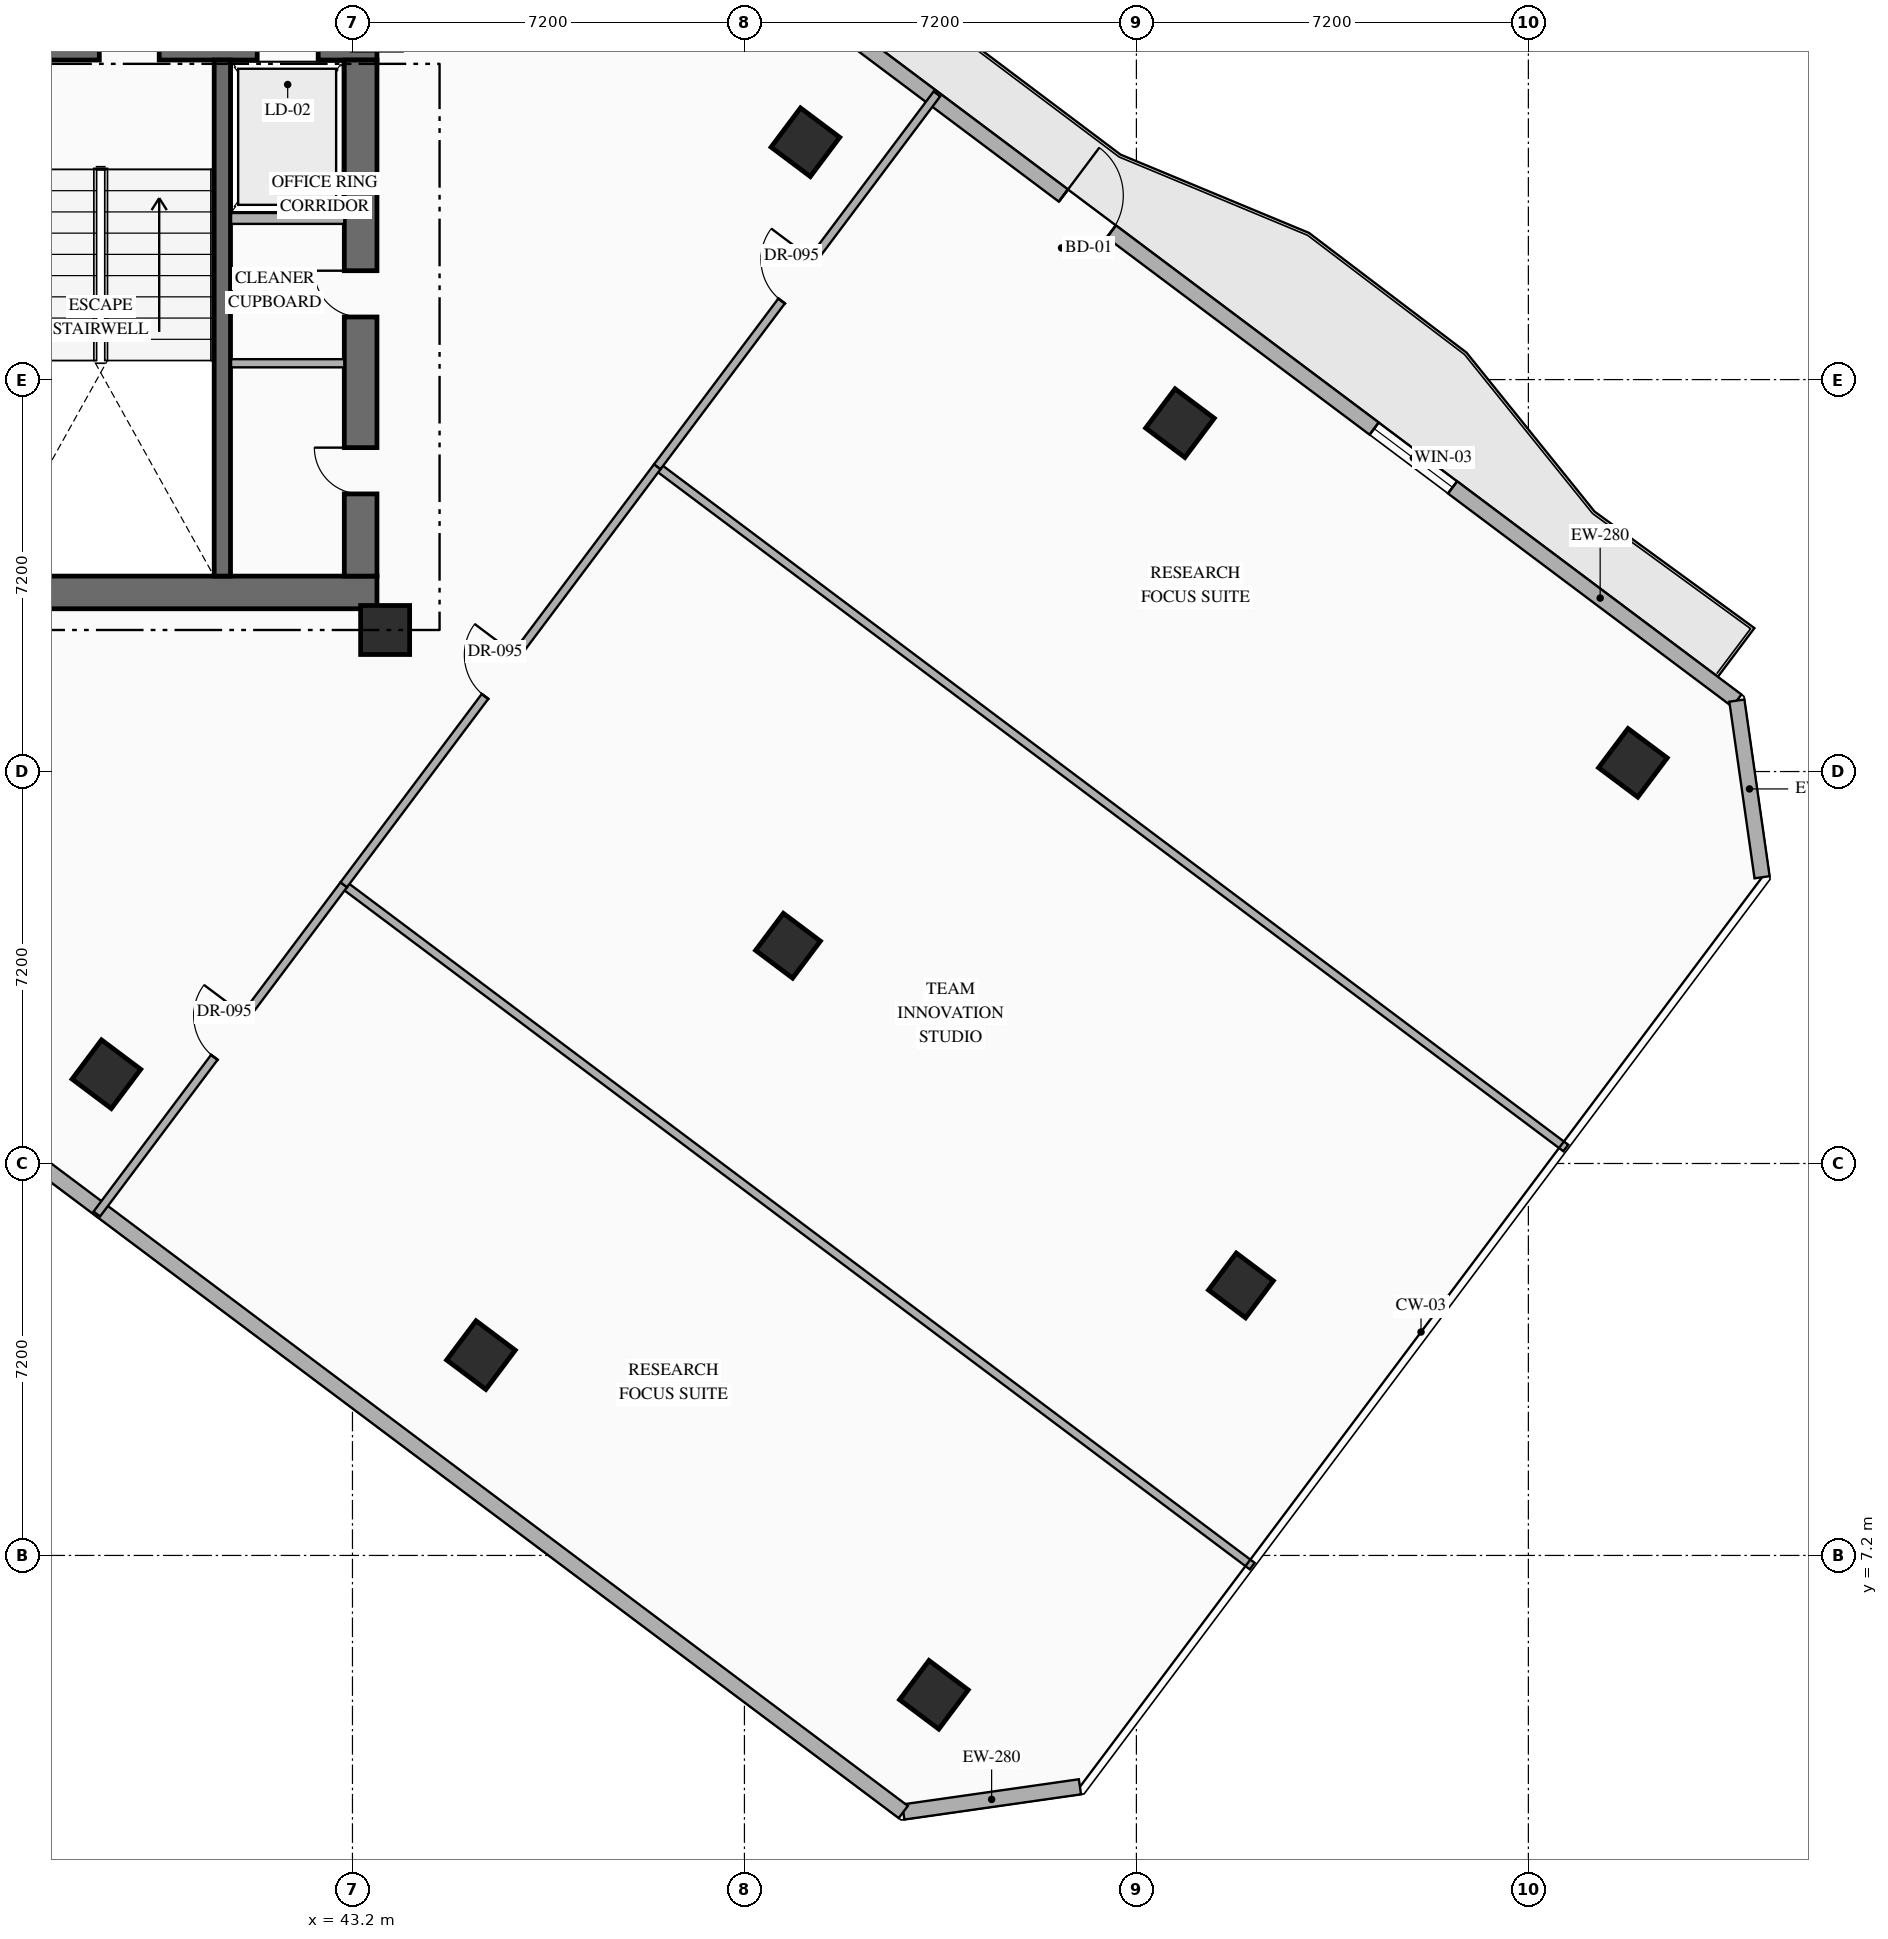
"""IFC4 building model, lengths in metres.
Left out: names, types, materials, properties, quantities, classifications, styles, units other than length and angle.
Written with IfcOpenShell. Run it as: python <this file> out.ifc"""

import sys

from ifc_helpers import new_model, si_unit, direction, frame, frame_2d, origin, origin_2d, place, context, subcontext, project, spatial, rectangle, hollow_rectangle, extrude, element, fill, save


model = new_model("IFC4")
c1 = context("Model", 3, precision=1e-05, world=origin(), true_north=direction((0.0, 1.0)))
c2 = subcontext(c1, "Body", "Model", "MODEL_VIEW")
j1 = project(units=[si_unit("LENGTHUNIT", "METRE"), si_unit("PLANEANGLEUNIT", "RADIAN")], contexts=[c1])
p1 = place(None, origin())
s1 = spatial("IfcSite", under=j1, at=p1, CompositionType="ELEMENT")
p2 = place(p1, origin())
s2 = spatial("IfcBuilding", under=s1, at=p2, CompositionType="ELEMENT")
p3 = place(p2, frame((0.0, 0.0, 119.25)))
s3 = spatial("IfcBuildingStorey", under=s2, at=p3, CompositionType="ELEMENT", Elevation=119.25)
p4 = place(p3, frame((35.89, 24.89, 0.0), z_axis=(0.0, 0.0, 1.0), x_axis=(1.0, 0.0, 0.0)))
e1 = element("IfcWall", 1, at=p4, inside=s3, PredefinedType="SHEAR", context=c2, shape_type="SweptSolid", body=[
    extrude(rectangle(XDim=7.76, YDim=0.6, at=frame_2d((3.88, 0.0))), origin(), (0.0, 0.0, 1.0), 3.6),
])
p5 = place(p3, frame((35.89, 34.97, 0.0), z_axis=(0.0, 0.0, 1.0), x_axis=(1.0, 0.0, 0.0)))
e2 = element("IfcWall", 2, at=p5, inside=s3, PredefinedType="SHEAR", context=c2, shape_type="SweptSolid", body=[
    extrude(rectangle(XDim=7.76, YDim=0.6, at=frame_2d((3.88, 0.0))), origin(), (0.0, 0.0, 1.0), 3.6),
])
p6 = place(p5, frame((2.66, 0.0, 0.0)))
e3 = element("IfcOpeningElement", 3, at=p6, cuts=e2, PredefinedType="OPENING", context=c2, shape_type="SweptSolid", body=[
    extrude(rectangle(XDim=1.1, YDim=2.2, at=frame_2d((0.55, 1.1))), frame((0.0, 0.31, 0.0), z_axis=(0.0, -1.0, 0.0), x_axis=(1.0, 0.0, 0.0)), (0.0, 0.0, 1.0), 0.62),
])
p7 = place(p5, frame((5.56, 0.0, 0.0)))
e4 = element("IfcOpeningElement", 4, at=p7, cuts=e2, PredefinedType="OPENING", context=c2, shape_type="SweptSolid", body=[
    extrude(rectangle(XDim=1.12, YDim=2.15, at=frame_2d((0.56, 1.075))), frame((0.0, 0.31, 0.0), z_axis=(0.0, -1.0, 0.0), x_axis=(1.0, 0.0, 0.0)), (0.0, 0.0, 1.0), 0.62),
])
p8 = place(p3, frame((43.35, 25.19, 0.0), z_axis=(0.0, 0.0, 1.0), x_axis=(0.0, 1.0, 0.0)))
e5 = element("IfcWall", 5, at=p8, inside=s3, PredefinedType="SHEAR", context=c2, shape_type="SweptSolid", body=[
    extrude(rectangle(XDim=9.48, YDim=0.6, at=frame_2d((4.74, 0.0))), origin(), (0.0, 0.0, 1.0), 3.6),
])
p9 = place(p8, frame((1.51, 0.0, 0.0)))
e6 = element("IfcOpeningElement", 6, at=p9, cuts=e5, PredefinedType="OPENING", context=c2, shape_type="SweptSolid", body=[
    extrude(rectangle(XDim=0.85, YDim=2.08, at=frame_2d((0.425, 1.04))), frame((0.0, 0.31, 0.0), z_axis=(0.0, -1.0, 0.0), x_axis=(1.0, 0.0, 0.0)), (0.0, 0.0, 1.0), 0.62),
])
p10 = place(p8, frame((4.76, 0.0, 0.0)))
e7 = element("IfcOpeningElement", 7, at=p10, cuts=e5, PredefinedType="OPENING", context=c2, shape_type="SweptSolid", body=[
    extrude(rectangle(XDim=0.85, YDim=2.08, at=frame_2d((0.425, 1.04))), frame((0.0, 0.31, 0.0), z_axis=(0.0, -1.0, 0.0), x_axis=(1.0, 0.0, 0.0)), (0.0, 0.0, 1.0), 0.62),
])
p11 = place(p3, frame((40.81, 25.19, 0.0), z_axis=(0.0, 0.0, 1.0), x_axis=(0.0, 1.0, 0.0)))
e8 = element("IfcWall", 8, at=p11, inside=s3, PredefinedType="SHEAR", context=c2, shape_type="SweptSolid", body=[
    extrude(rectangle(XDim=9.48, YDim=0.3, at=frame_2d((4.74, 0.0))), origin(), (0.0, 0.0, 1.0), 3.6),
])
p12 = place(p3, frame((43.8, 24.2, 0.0), z_axis=(0.0, 0.0, 1.0), x_axis=(1.0, 0.0, 0.0)))
e9 = element("IfcColumn", 9, at=p12, inside=s3, PredefinedType="COLUMN", context=c2, shape_type="SweptSolid", body=[
    extrude(rectangle(XDim=0.9, YDim=0.9, at=origin_2d()), origin(), (0.0, 0.0, 1.0), 3.6),
])
for number, where, z_axis, x_axis in (
    (10, (38.68, 16.04, 0.0), (0.0, 0.0, 1.0), (0.8, -0.6, 0.0)),
    (11, (51.52, 33.16, 0.0), (0.0, 0.0, 1.0), (0.8, -0.6, 0.0)),
    (12, (45.56, 10.88, 0.0), (0.0, 0.0, 1.0), (0.8, -0.6, 0.0)),
    (13, (58.4, 28.0, 0.0), (0.0, 0.0, 1.0), (0.8, -0.6, 0.0)),
):
    element("IfcColumn", number, at=place(p3, frame(where, z_axis=z_axis, x_axis=x_axis)), inside=s3, PredefinedType="COLUMN", context=c2, shape_type="SweptSolid", body=[
        extrude(hollow_rectangle(XDim=0.9, YDim=0.9, WallThickness=0.036, at=origin_2d()), origin(), (0.0, 0.0, 1.0), 3.6),
    ])
p13 = place(p3, frame((51.2, 18.4, 0.0), z_axis=(0.0, 0.0, 1.0), x_axis=(0.799999996291, -0.600000004945, 0.0)))
e14 = element("IfcColumn", 14, at=p13, inside=s3, PredefinedType="COLUMN", context=c2, shape_type="SweptSolid", body=[
    extrude(hollow_rectangle(XDim=0.85, YDim=0.85, WallThickness=0.032, at=origin_2d()), origin(), (0.0, 0.0, 1.0), 3.6),
])
for number, where, z_axis, x_axis in (
    (15, (53.88, 4.64, 0.0), (0.0, 0.0, 1.0), (0.8, -0.6, 0.0)),
    (16, (66.72, 21.76, 0.0), (0.0, 0.0, 1.0), (0.8, -0.6, 0.0)),
):
    element("IfcColumn", number, at=place(p3, frame(where, z_axis=z_axis, x_axis=x_axis)), inside=s3, PredefinedType="COLUMN", context=c2, shape_type="SweptSolid", body=[
        extrude(hollow_rectangle(XDim=0.9, YDim=0.9, WallThickness=0.036, at=origin_2d()), origin(), (0.0, 0.0, 1.0), 3.6),
    ])
p14 = place(p3, frame((59.52, 12.16, 0.0), z_axis=(0.0, 0.0, 1.0), x_axis=(0.799999996291, -0.600000004945, 0.0)))
e17 = element("IfcColumn", 17, at=p14, inside=s3, PredefinedType="COLUMN", context=c2, shape_type="SweptSolid", body=[
    extrude(hollow_rectangle(XDim=0.85, YDim=0.85, WallThickness=0.032, at=origin_2d()), origin(), (0.0, 0.0, 1.0), 3.6),
])
p15 = place(p3, frame((44.86, 40.73, 0.0), z_axis=(0.0, 0.0, 1.0), x_axis=(0.800006902154, -0.599990797017, 0.0)))
e18 = element("IfcWall", 18, at=p15, inside=s3, PredefinedType="STANDARD", context=c2, shape_type="SweptSolid", body=[
    extrude(rectangle(XDim=29.712, YDim=0.28, at=frame_2d((14.856, 0.0))), origin(), (0.0, 0.0, 1.0), 3.35),
])
p16 = place(p15, frame((14.249, 0.0, 0.0)))
e19 = element("IfcOpeningElement", 19, at=p16, cuts=e18, PredefinedType="OPENING", context=c2, shape_type="SweptSolid", body=[
    extrude(rectangle(XDim=1.1, YDim=2.2, at=frame_2d((0.55, 1.1))), frame((0.0, 0.15, 0.0), z_axis=(0.0, -1.0, 0.0), x_axis=(1.0, 0.0, 0.0)), (0.0, 0.0, 1.0), 0.3),
])
p17 = place(p15, frame((6.528, 0.0, 0.85)))
e20 = element("IfcOpeningElement", 20, at=p17, cuts=e18, PredefinedType="OPENING", context=c2, shape_type="SweptSolid", body=[
    extrude(rectangle(XDim=1.8, YDim=2.1, at=frame_2d((0.9, 1.05))), frame((0.0, 0.15, 0.0), z_axis=(0.0, -1.0, 0.0), x_axis=(1.0, 0.0, 0.0)), (0.0, 0.0, 1.0), 0.3),
])
p18 = place(p15, frame((21.384, 0.0, 0.85)))
e21 = element("IfcOpeningElement", 21, at=p18, cuts=e18, PredefinedType="OPENING", context=c2, shape_type="SweptSolid", body=[
    extrude(rectangle(XDim=1.8, YDim=2.1, at=frame_2d((0.9, 1.05))), frame((0.0, 0.15, 0.0), z_axis=(0.0, -1.0, 0.0), x_axis=(1.0, 0.0, 0.0)), (0.0, 0.0, 1.0), 0.3),
])
p19 = place(p3, frame((68.63, 22.903, 0.0), z_axis=(0.0, 0.0, 1.0), x_axis=(0.141285803956, -0.989968848803, 0.0)))
e22 = element("IfcWall", 22, at=p19, inside=s3, PredefinedType="STANDARD", context=c2, shape_type="SweptSolid", body=[
    extrude(rectangle(XDim=3.278, YDim=0.28, at=frame_2d((1.639, 0.0))), origin(), (0.0, 0.0, 1.0), 3.35),
])
p20 = place(p3, frame((56.563, 2.95, 0.0), z_axis=(0.0, 0.0, 1.0), x_axis=(-0.989977778067, -0.141223223777, 0.0)))
e23 = element("IfcWall", 23, at=p20, inside=s3, PredefinedType="STANDARD", context=c2, shape_type="SweptSolid", body=[
    extrude(rectangle(XDim=3.278, YDim=0.28, at=frame_2d((1.639, 0.0))), origin(), (0.0, 0.0, 1.0), 3.35),
])
p21 = place(p3, frame((53.318, 2.487, 0.0), z_axis=(0.0, 0.0, 1.0), x_axis=(-0.800004174678, 0.599994433723, 0.0)))
e24 = element("IfcWall", 24, at=p21, inside=s3, PredefinedType="STANDARD", context=c2, shape_type="SweptSolid", body=[
    extrude(rectangle(XDim=35.089, YDim=0.28, at=frame_2d((17.544, 0.0))), origin(), (0.0, 0.0, 1.0), 3.35),
])
p22 = place(p3, frame((40.97, 31.76, 0.0), z_axis=(0.0, 0.0, 1.0), x_axis=(1.0, 0.0, 0.0)))
e25 = element("IfcWall", 25, at=p22, inside=s3, PredefinedType="STANDARD", context=c2, shape_type="SweptSolid", body=[
    extrude(rectangle(XDim=2.08, YDim=0.2, at=frame_2d((1.04, 0.0))), origin(), (0.0, 0.0, 1.0), 3.35),
])
p23 = place(p3, frame((40.97, 29.1, 0.0), z_axis=(0.0, 0.0, 1.0), x_axis=(1.0, 0.0, 0.0)))
e26 = element("IfcWall", 26, at=p23, inside=s3, PredefinedType="PARTITIONING", context=c2, shape_type="SweptSolid", body=[
    extrude(rectangle(XDim=2.08, YDim=0.15, at=frame_2d((1.04, 0.0))), origin(), (0.0, 0.0, 1.0), 3.35),
])
p24 = place(p3, frame((43.04, 19.52, 0.0), z_axis=(0.0, 0.0, 1.0), x_axis=(0.799997191095, -0.600003745189, 0.0)))
e27 = element("IfcWall", 27, at=p24, inside=s3, PredefinedType="PARTITIONING", context=c2, shape_type="SweptSolid", body=[
    extrude(rectangle(XDim=20.86, YDim=0.15, at=frame_2d((10.43, 0.0))), origin(), (0.0, 0.0, 1.0), 3.35),
])
p25 = place(p3, frame((38.504, 13.472, 0.0), z_axis=(0.0, 0.0, 1.0), x_axis=(0.600005166878, 0.799996124815, 0.0)))
e28 = element("IfcWall", 28, at=p25, inside=s3, PredefinedType="PARTITIONING", context=c2, shape_type="SweptSolid", body=[
    extrude(rectangle(XDim=7.56, YDim=0.15, at=frame_2d((3.78, 0.0))), origin(), (0.0, 0.0, 1.0), 3.35),
])
p26 = place(p25, frame((3.598, 0.0, 0.0)))
e29 = element("IfcOpeningElement", 29, at=p26, cuts=e28, PredefinedType="OPENING", context=c2, shape_type="SweptSolid", body=[
    extrude(rectangle(XDim=0.95, YDim=2.15, at=frame_2d((0.475, 1.075))), frame((0.0, 0.085, 0.0), z_axis=(0.0, -1.0, 0.0), x_axis=(1.0, 0.0, 0.0)), (0.0, 0.0, 1.0), 0.17),
])
p27 = place(p3, frame((48.8, 27.2, 0.0), z_axis=(0.0, 0.0, 1.0), x_axis=(0.800002808908, -0.599996254772, 0.0)))
e30 = element("IfcWall", 30, at=p27, inside=s3, PredefinedType="PARTITIONING", context=c2, shape_type="SweptSolid", body=[
    extrude(rectangle(XDim=20.86, YDim=0.15, at=frame_2d((10.43, 0.0))), origin(), (0.0, 0.0, 1.0), 3.35),
])
p28 = place(p3, frame((43.04, 19.52, 0.0), z_axis=(0.0, 0.0, 1.0), x_axis=(0.600004069023, 0.799996948216, 0.0)))
e31 = element("IfcWall", 31, at=p28, inside=s3, PredefinedType="PARTITIONING", context=c2, shape_type="SweptSolid", body=[
    extrude(rectangle(XDim=9.6, YDim=0.15, at=frame_2d((4.8, 0.0))), origin(), (0.0, 0.0, 1.0), 3.35),
])
p29 = place(p28, frame((4.325, 0.0, 0.0)))
e32 = element("IfcOpeningElement", 32, at=p29, cuts=e31, PredefinedType="OPENING", context=c2, shape_type="SweptSolid", body=[
    extrude(rectangle(XDim=0.95, YDim=2.15, at=frame_2d((0.475, 1.075))), frame((0.0, 0.085, 0.0), z_axis=(0.0, -1.0, 0.0), x_axis=(1.0, 0.0, 0.0)), (0.0, 0.0, 1.0), 0.17),
])
p30 = place(p3, frame((48.8, 27.2, 0.0), z_axis=(0.0, 0.0, 1.0), x_axis=(0.599990873323, 0.800006844926, 0.0)))
e33 = element("IfcWall", 33, at=p30, inside=s3, PredefinedType="PARTITIONING", context=c2, shape_type="SweptSolid", body=[
    extrude(rectangle(XDim=8.56, YDim=0.15, at=frame_2d((4.28, 0.0))), origin(), (0.0, 0.0, 1.0), 3.35),
])
p31 = place(p30, frame((3.805, 0.0, 0.0)))
e34 = element("IfcOpeningElement", 34, at=p31, cuts=e33, PredefinedType="OPENING", context=c2, shape_type="SweptSolid", body=[
    extrude(rectangle(XDim=0.95, YDim=2.15, at=frame_2d((0.475, 1.075))), frame((0.0, 0.085, 0.0), z_axis=(0.0, -1.0, 0.0), x_axis=(1.0, 0.0, 0.0)), (0.0, 0.0, 1.0), 0.17),
])
p32 = place(p16, origin())
e35 = element("IfcDoor", 35, at=p32, inside=s3, OperationType="SINGLE_SWING_LEFT", PredefinedType="DOOR", context=c2, shape_type="SweptSolid", body=[
    extrude(rectangle(XDim=1.1, YDim=2.2, at=frame_2d((0.55, 1.1))), frame((0.0, 0.025, 0.0), z_axis=(0.0, -1.0, 0.0), x_axis=(1.0, 0.0, 0.0)), (0.0, 0.0, 1.0), 0.05),
])
fill(e19, e35)
p33 = place(p18, origin())
e36 = element("IfcWindow", 36, at=p33, inside=s3, PartitioningType="SINGLE_PANEL", PredefinedType="WINDOW", context=c2, shape_type="SweptSolid", body=[
    extrude(rectangle(XDim=1.8, YDim=2.1, at=frame_2d((0.9, 1.05))), frame((0.0, 0.03, 0.0), z_axis=(0.0, -1.0, 0.0), x_axis=(1.0, 0.0, 0.0)), (0.0, 0.0, 1.0), 0.06),
])
fill(e21, e36)
p34 = place(p9, origin())
e37 = element("IfcDoor", 37, at=p34, inside=s3, OperationType="SINGLE_SWING_RIGHT", PredefinedType="DOOR", context=c2, shape_type="SweptSolid", body=[
    extrude(rectangle(XDim=0.85, YDim=2.08, at=frame_2d((0.425, 1.04))), frame((0.0, 0.025, 0.0), z_axis=(0.0, -1.0, 0.0), x_axis=(1.0, 0.0, 0.0)), (0.0, 0.0, 1.0), 0.05),
])
fill(e6, e37)
p35 = place(p10, origin())
e38 = element("IfcDoor", 38, at=p35, inside=s3, OperationType="SINGLE_SWING_RIGHT", PredefinedType="DOOR", context=c2, shape_type="SweptSolid", body=[
    extrude(rectangle(XDim=0.85, YDim=2.08, at=frame_2d((0.425, 1.04))), frame((0.0, 0.025, 0.0), z_axis=(0.0, -1.0, 0.0), x_axis=(1.0, 0.0, 0.0)), (0.0, 0.0, 1.0), 0.05),
])
fill(e7, e38)
p36 = place(p26, origin())
e39 = element("IfcDoor", 39, at=p36, inside=s3, OperationType="SINGLE_SWING_RIGHT", PredefinedType="DOOR", context=c2, shape_type="SweptSolid", body=[
    extrude(rectangle(XDim=0.95, YDim=2.15, at=frame_2d((0.475, 1.075))), frame((0.0, 0.025, 0.0), z_axis=(0.0, -1.0, 0.0), x_axis=(1.0, 0.0, 0.0)), (0.0, 0.0, 1.0), 0.05),
])
fill(e29, e39)
p37 = place(p29, origin())
e40 = element("IfcDoor", 40, at=p37, inside=s3, OperationType="SINGLE_SWING_RIGHT", PredefinedType="DOOR", context=c2, shape_type="SweptSolid", body=[
    extrude(rectangle(XDim=0.95, YDim=2.15, at=frame_2d((0.475, 1.075))), frame((0.0, 0.025, 0.0), z_axis=(0.0, -1.0, 0.0), x_axis=(1.0, 0.0, 0.0)), (0.0, 0.0, 1.0), 0.05),
])
fill(e32, e40)
p38 = place(p31, origin())
e41 = element("IfcDoor", 41, at=p38, inside=s3, OperationType="SINGLE_SWING_RIGHT", PredefinedType="DOOR", context=c2, shape_type="SweptSolid", body=[
    extrude(rectangle(XDim=0.95, YDim=2.15, at=frame_2d((0.475, 1.075))), frame((0.0, 0.025, 0.0), z_axis=(0.0, -1.0, 0.0), x_axis=(1.0, 0.0, 0.0)), (0.0, 0.0, 1.0), 0.05),
])
fill(e34, e41)
save(model, sys.argv[1])
